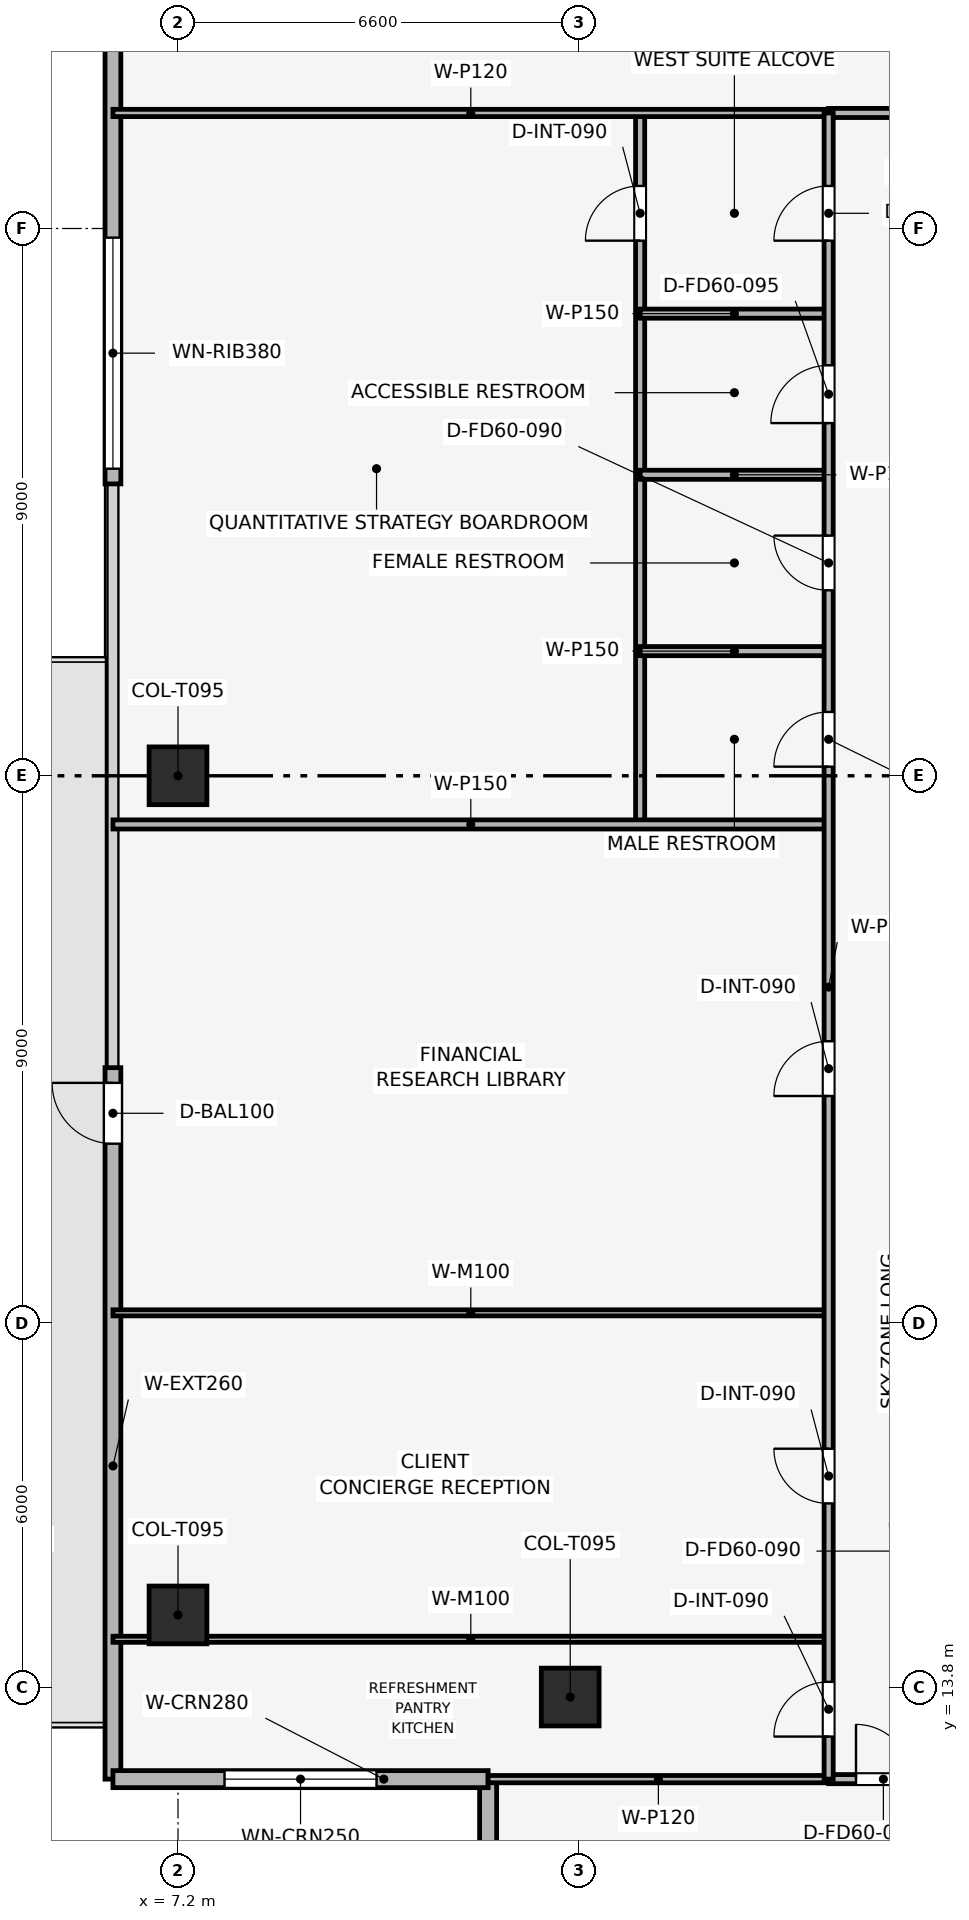
"""IFC4 building model, lengths in metres.
Left out: names, types, materials, properties, quantities, classifications, styles, units other than length and angle.
Written with IfcOpenShell. Run it as: python <this file> out.ifc"""

import sys

from ifc_helpers import new_model, si_unit, direction, frame, frame_2d, origin, origin_2d, place, context, subcontext, project, spatial, rectangle, extrude, element, fill, save


model = new_model("IFC4")
c1 = context("Model", 3, precision=1e-05, world=origin(), true_north=direction((0.0, 1.0)))
c2 = subcontext(c1, "Body", "Model", "MODEL_VIEW")
j1 = project(units=[si_unit("LENGTHUNIT", "METRE"), si_unit("PLANEANGLEUNIT", "RADIAN")], contexts=[c1])
p1 = place(None, origin())
s1 = spatial("IfcSite", under=j1, at=p1, CompositionType="ELEMENT")
p2 = place(p1, origin())
s2 = spatial("IfcBuilding", under=s1, at=p2, CompositionType="ELEMENT")
p3 = place(p2, frame((0.0, 0.0, 306.75)))
s3 = spatial("IfcBuildingStorey", under=s2, at=p3, CompositionType="ELEMENT", Elevation=306.75)
for number, where, z_axis, x_axis in (
    (1, (7.2, 28.8, 0.003), (0.0, 0.0, 1.0), (1.0, 0.0, 0.0)),
    (2, (7.2, 15.0, 0.003), (0.0, 0.0, 1.0), (1.0, 0.0, 0.0)),
    (3, (13.65, 13.65, 0.003), (0.0, 0.0, 1.0), (1.0, 0.0, 0.0)),
):
    element("IfcColumn", number, at=place(p3, frame(where, z_axis=z_axis, x_axis=x_axis)), inside=s3, PredefinedType="COLUMN", context=c2, shape_type="SweptSolid", body=[
        extrude(rectangle(XDim=0.95, YDim=0.95, at=origin_2d()), origin(), (0.0, 0.0, 1.0), 3.504),
    ])
p4 = place(p3, frame((6.13, 12.3, 0.0), z_axis=(0.0, 0.0, 1.0), x_axis=(0.0, 1.0, 0.0)))
e4 = element("IfcWall", 4, at=p4, inside=s3, PredefinedType="SOLIDWALL", context=c2, shape_type="SweptSolid", body=[
    extrude(rectangle(XDim=11.7, YDim=0.26, at=frame_2d((5.85, 0.0))), origin(), (0.0, 0.0, 1.0), 3.51),
])
p5 = place(p4, frame((10.45, 0.0, 0.0)))
e5 = element("IfcOpeningElement", 5, at=p5, cuts=e4, PredefinedType="OPENING", context=c2, shape_type="SweptSolid", body=[
    extrude(rectangle(XDim=1.0, YDim=2.2, at=frame_2d((0.5, 1.1))), frame((0.0, 0.14, 0.0), z_axis=(0.0, -1.0, 0.0), x_axis=(1.0, 0.0, 0.0)), (0.0, 0.0, 1.0), 0.28),
])
p6 = place(p3, frame((6.13, 33.6, 0.0), z_axis=(0.0, 0.0, 1.0), x_axis=(0.0, 1.0, 0.0)))
e6 = element("IfcWall", 6, at=p6, inside=s3, PredefinedType="SOLIDWALL", context=c2, shape_type="SweptSolid", body=[
    extrude(rectangle(XDim=11.7, YDim=0.26, at=frame_2d((5.85, 0.0))), origin(), (0.0, 0.0, 1.0), 3.51),
])
p7 = place(p6, frame((0.25, 0.0, 0.9)))
e7 = element("IfcOpeningElement", 7, at=p7, cuts=e6, PredefinedType="OPENING", context=c2, shape_type="SweptSolid", body=[
    extrude(rectangle(XDim=3.8, YDim=1.9, at=frame_2d((1.9, 0.95))), frame((0.0, 0.14, 0.0), z_axis=(0.0, -1.0, 0.0), x_axis=(1.0, 0.0, 0.0)), (0.0, 0.0, 1.0), 0.28),
])
p8 = place(p3, frame((12.3, 6.13, 0.0), z_axis=(0.0, 0.0, 1.0), x_axis=(0.0, 1.0, 0.0)))
e8 = element("IfcWall", 8, at=p8, inside=s3, PredefinedType="SOLIDWALL", context=c2, shape_type="SweptSolid", body=[
    extrude(rectangle(XDim=6.17, YDim=0.28, at=frame_2d((3.085, 0.0))), origin(), (0.0, 0.0, 1.0), 3.51),
])
p9 = place(p8, frame((1.835, 0.0, 0.9)))
e9 = element("IfcOpeningElement", 9, at=p9, cuts=e8, PredefinedType="OPENING", context=c2, shape_type="SweptSolid", body=[
    extrude(rectangle(XDim=2.5, YDim=1.9, at=frame_2d((1.25, 0.95))), frame((0.0, 0.15, 0.0), z_axis=(0.0, -1.0, 0.0), x_axis=(1.0, 0.0, 0.0)), (0.0, 0.0, 1.0), 0.3),
])
p10 = place(p3, frame((12.3, 12.3, 0.0), z_axis=(0.0, 0.0, 1.0), x_axis=(-1.0, 0.0, 0.0)))
e10 = element("IfcWall", 10, at=p10, inside=s3, PredefinedType="SOLIDWALL", context=c2, shape_type="SweptSolid", body=[
    extrude(rectangle(XDim=6.17, YDim=0.28, at=frame_2d((3.085, 0.0))), origin(), (0.0, 0.0, 1.0), 3.51),
])
p11 = place(p10, frame((1.835, 0.0, 0.9)))
e11 = element("IfcOpeningElement", 11, at=p11, cuts=e10, PredefinedType="OPENING", context=c2, shape_type="SweptSolid", body=[
    extrude(rectangle(XDim=2.5, YDim=1.9, at=frame_2d((1.25, 0.95))), frame((0.0, 0.15, 0.0), z_axis=(0.0, -1.0, 0.0), x_axis=(1.0, 0.0, 0.0)), (0.0, 0.0, 1.0), 0.3),
])
p12 = place(p3, frame((14.8, 28.0, 0.0), z_axis=(0.0, 0.0, 1.0), x_axis=(0.0, 1.0, 0.0)))
e12 = element("IfcWall", 12, at=p12, inside=s3, PredefinedType="PARTITIONING", context=c2, shape_type="SweptSolid", body=[
    extrude(rectangle(XDim=11.7, YDim=0.15, at=frame_2d((5.85, 0.0))), origin(), (0.0, 0.0, 1.0), 3.095),
])
p13 = place(p12, frame((9.6, 0.0, 0.0)))
e13 = element("IfcOpeningElement", 13, at=p13, cuts=e12, PredefinedType="OPENING", context=c2, shape_type="SweptSolid", body=[
    extrude(rectangle(XDim=0.9, YDim=2.1, at=frame_2d((0.45, 1.05))), frame((0.0, 0.085, 0.0), z_axis=(0.0, -1.0, 0.0), x_axis=(1.0, 0.0, 0.0)), (0.0, 0.0, 1.0), 0.17),
])
p14 = place(p3, frame((6.13, 28.0, 0.0), z_axis=(0.0, 0.0, 1.0), x_axis=(1.0, 0.0, 0.0)))
e14 = element("IfcWall", 14, at=p14, inside=s3, PredefinedType="PARTITIONING", context=c2, shape_type="SweptSolid", body=[
    extrude(rectangle(XDim=11.77, YDim=0.15, at=frame_2d((5.885, 0.0))), origin(), (0.0, 0.0, 1.0), 3.135),
])
for number, where, z_axis, x_axis in (
    (15, (14.8, 36.4, 0.0), (0.0, 0.0, 1.0), (1.0, 0.0, 0.0)),
    (16, (14.8, 30.85, 0.0), (0.0, 0.0, 1.0), (1.0, 0.0, 0.0)),
    (17, (14.8, 33.75, 0.0), (0.0, 0.0, 1.0), (1.0, 0.0, 0.0)),
):
    element("IfcWall", number, at=place(p3, frame(where, z_axis=z_axis, x_axis=x_axis)), inside=s3, PredefinedType="PARTITIONING", context=c2, shape_type="SweptSolid", body=[
        extrude(rectangle(XDim=3.1, YDim=0.15, at=frame_2d((1.55, 0.0))), origin(), (0.0, 0.0, 1.0), 3.135),
    ])
p15 = place(p3, frame((6.13, 14.6, 0.0), z_axis=(0.0, 0.0, 1.0), x_axis=(1.0, 0.0, 0.0)))
e18 = element("IfcWall", 18, at=p15, inside=s3, PredefinedType="MOVABLE", context=c2, shape_type="SweptSolid", body=[
    extrude(rectangle(XDim=11.77, YDim=0.1, at=frame_2d((5.885, 0.0))), origin(), (0.0, 0.0, 1.0), 3.095),
])
p16 = place(p3, frame((6.13, 19.968, 0.0), z_axis=(0.0, 0.0, 1.0), x_axis=(1.0, 0.0, 0.0)))
e19 = element("IfcWall", 19, at=p16, inside=s3, PredefinedType="MOVABLE", context=c2, shape_type="SweptSolid", body=[
    extrude(rectangle(XDim=11.77, YDim=0.1, at=frame_2d((5.885, 0.0))), origin(), (0.0, 0.0, 1.0), 3.195),
])
p17 = place(p3, frame((12.3, 12.3, 0.0), z_axis=(0.0, 0.0, 1.0), x_axis=(1.0, 0.0, 0.0)))
e20 = element("IfcWall", 20, at=p17, inside=s3, PredefinedType="PARTITIONING", context=c2, shape_type="SweptSolid", body=[
    extrude(rectangle(XDim=5.6, YDim=0.12, at=frame_2d((2.8, 0.0))), origin(), (0.0, 0.0, 1.0), 3.195),
])
p18 = place(p3, frame((17.9, 12.3, 0.0), z_axis=(0.0, 0.0, 1.0), x_axis=(1.0, 0.0, 0.0)))
e21 = element("IfcWall", 21, at=p18, inside=s3, PredefinedType="PARTITIONING", context=c2, shape_type="SweptSolid", body=[
    extrude(rectangle(XDim=1.9, YDim=0.15, at=frame_2d((0.95, 0.0))), origin(), (0.0, 0.0, 1.0), 3.51),
])
p19 = place(p18, frame((0.45, 0.0, 0.0)))
e22 = element("IfcOpeningElement", 22, at=p19, cuts=e21, PredefinedType="OPENING", context=c2, shape_type="SweptSolid", body=[
    extrude(rectangle(XDim=0.9, YDim=2.1, at=frame_2d((0.45, 1.05))), frame((0.0, 0.085, 0.0), z_axis=(0.0, -1.0, 0.0), x_axis=(1.0, 0.0, 0.0)), (0.0, 0.0, 1.0), 0.17),
])
p20 = place(p3, frame((6.13, 39.7, 0.0), z_axis=(0.0, 0.0, 1.0), x_axis=(1.0, 0.0, 0.0)))
e23 = element("IfcWall", 23, at=p20, inside=s3, PredefinedType="PARTITIONING", context=c2, shape_type="SweptSolid", body=[
    extrude(rectangle(XDim=11.77, YDim=0.12, at=frame_2d((5.885, 0.0))), origin(), (0.0, 0.0, 1.0), 3.095),
])
p21 = place(p3, frame((17.9, 39.7, 0.0), z_axis=(0.0, 0.0, 1.0), x_axis=(1.0, 0.0, 0.0)))
e24 = element("IfcWall", 24, at=p21, inside=s3, PredefinedType="PARTITIONING", context=c2, shape_type="SweptSolid", body=[
    extrude(rectangle(XDim=21.8, YDim=0.15, at=frame_2d((10.9, 0.0))), origin(), (0.0, 0.0, 1.0), 3.095),
])
p22 = place(p21, frame((1.302, 0.0, 0.0)))
e25 = element("IfcOpeningElement", 25, at=p22, cuts=e24, PredefinedType="OPENING", context=c2, shape_type="SweptSolid", body=[
    extrude(rectangle(XDim=0.9, YDim=2.1, at=frame_2d((0.45, 1.05))), frame((0.0, 0.085, 0.0), z_axis=(0.0, -1.0, 0.0), x_axis=(1.0, 0.0, 0.0)), (0.0, 0.0, 1.0), 0.17),
])
p23 = place(p21, frame((12.202, 0.0, 0.0)))
e26 = element("IfcOpeningElement", 26, at=p23, cuts=e24, PredefinedType="OPENING", context=c2, shape_type="SweptSolid", body=[
    extrude(rectangle(XDim=0.9, YDim=2.1, at=frame_2d((0.45, 1.05))), frame((0.0, 0.085, 0.0), z_axis=(0.0, -1.0, 0.0), x_axis=(1.0, 0.0, 0.0)), (0.0, 0.0, 1.0), 0.17),
])
p24 = place(p3, frame((17.9, 12.3, 0.0), z_axis=(0.0, 0.0, 1.0), x_axis=(0.0, 1.0, 0.0)))
e27 = element("IfcWall", 27, at=p24, inside=s3, PredefinedType="PARTITIONING", context=c2, shape_type="SweptSolid", body=[
    extrude(rectangle(XDim=27.4, YDim=0.15, at=frame_2d((13.7, 0.0))), origin(), (0.0, 0.0, 1.0), 3.095),
])
p25 = place(p24, frame((0.7, 0.0, 0.0)))
e28 = element("IfcOpeningElement", 28, at=p25, cuts=e27, PredefinedType="OPENING", context=c2, shape_type="SweptSolid", body=[
    extrude(rectangle(XDim=0.9, YDim=2.1, at=frame_2d((0.45, 1.05))), frame((0.0, 0.085, 0.0), z_axis=(0.0, -1.0, 0.0), x_axis=(1.0, 0.0, 0.0)), (0.0, 0.0, 1.0), 0.17),
])
p26 = place(p24, frame((4.534, 0.0, 0.0)))
e29 = element("IfcOpeningElement", 29, at=p26, cuts=e27, PredefinedType="OPENING", context=c2, shape_type="SweptSolid", body=[
    extrude(rectangle(XDim=0.9, YDim=2.1, at=frame_2d((0.45, 1.05))), frame((0.0, 0.085, 0.0), z_axis=(0.0, -1.0, 0.0), x_axis=(1.0, 0.0, 0.0)), (0.0, 0.0, 1.0), 0.17),
])
p27 = place(p24, frame((11.234, 0.0, 0.0)))
e30 = element("IfcOpeningElement", 30, at=p27, cuts=e27, PredefinedType="OPENING", context=c2, shape_type="SweptSolid", body=[
    extrude(rectangle(XDim=0.9, YDim=2.1, at=frame_2d((0.45, 1.05))), frame((0.0, 0.085, 0.0), z_axis=(0.0, -1.0, 0.0), x_axis=(1.0, 0.0, 0.0)), (0.0, 0.0, 1.0), 0.17),
])
p28 = place(p24, frame((16.65, 0.0, 0.0)))
e31 = element("IfcOpeningElement", 31, at=p28, cuts=e27, PredefinedType="OPENING", context=c2, shape_type="SweptSolid", body=[
    extrude(rectangle(XDim=0.9, YDim=2.1, at=frame_2d((0.45, 1.05))), frame((0.0, 0.085, 0.0), z_axis=(0.0, -1.0, 0.0), x_axis=(1.0, 0.0, 0.0)), (0.0, 0.0, 1.0), 0.17),
])
p29 = place(p24, frame((19.55, 0.0, 0.0)))
e32 = element("IfcOpeningElement", 32, at=p29, cuts=e27, PredefinedType="OPENING", context=c2, shape_type="SweptSolid", body=[
    extrude(rectangle(XDim=0.9, YDim=2.1, at=frame_2d((0.45, 1.05))), frame((0.0, 0.085, 0.0), z_axis=(0.0, -1.0, 0.0), x_axis=(1.0, 0.0, 0.0)), (0.0, 0.0, 1.0), 0.17),
])
p30 = place(p24, frame((22.3, 0.0, 0.0)))
e33 = element("IfcOpeningElement", 33, at=p30, cuts=e27, PredefinedType="OPENING", context=c2, shape_type="SweptSolid", body=[
    extrude(rectangle(XDim=0.95, YDim=2.1, at=frame_2d((0.475, 1.05))), frame((0.0, 0.085, 0.0), z_axis=(0.0, -1.0, 0.0), x_axis=(1.0, 0.0, 0.0)), (0.0, 0.0, 1.0), 0.17),
])
p31 = place(p24, frame((25.3, 0.0, 0.0)))
e34 = element("IfcOpeningElement", 34, at=p31, cuts=e27, PredefinedType="OPENING", context=c2, shape_type="SweptSolid", body=[
    extrude(rectangle(XDim=0.9, YDim=2.1, at=frame_2d((0.45, 1.05))), frame((0.0, 0.085, 0.0), z_axis=(0.0, -1.0, 0.0), x_axis=(1.0, 0.0, 0.0)), (0.0, 0.0, 1.0), 0.17),
])
p32 = place(p5, origin())
e35 = element("IfcDoor", 35, at=p32, inside=s3, OperationType="SINGLE_SWING_RIGHT", PredefinedType="DOOR", context=c2, shape_type="SweptSolid", body=[
    extrude(rectangle(XDim=1.0, YDim=2.2, at=frame_2d((0.5, 1.1))), frame((0.0, 0.025, 0.0), z_axis=(0.0, -1.0, 0.0), x_axis=(1.0, 0.0, 0.0)), (0.0, 0.0, 1.0), 0.05),
])
fill(e5, e35)
p33 = place(p7, origin())
e36 = element("IfcWindow", 36, at=p33, inside=s3, PartitioningType="SINGLE_PANEL", PredefinedType="WINDOW", context=c2, shape_type="SweptSolid", body=[
    extrude(rectangle(XDim=3.8, YDim=1.9, at=frame_2d((1.9, 0.95))), frame((0.0, 0.03, 0.0), z_axis=(0.0, -1.0, 0.0), x_axis=(1.0, 0.0, 0.0)), (0.0, 0.0, 1.0), 0.06),
])
fill(e7, e36)
p34 = place(p11, origin())
e37 = element("IfcWindow", 37, at=p34, inside=s3, PartitioningType="SINGLE_PANEL", PredefinedType="WINDOW", context=c2, shape_type="SweptSolid", body=[
    extrude(rectangle(XDim=2.5, YDim=1.9, at=frame_2d((1.25, 0.95))), frame((0.0, 0.03, 0.0), z_axis=(0.0, -1.0, 0.0), x_axis=(1.0, 0.0, 0.0)), (0.0, 0.0, 1.0), 0.06),
])
fill(e11, e37)
p35 = place(p13, origin())
e38 = element("IfcDoor", 38, at=p35, inside=s3, OperationType="SINGLE_SWING_LEFT", PredefinedType="DOOR", context=c2, shape_type="SweptSolid", body=[
    extrude(rectangle(XDim=0.9, YDim=2.1, at=frame_2d((0.45, 1.05))), frame((0.0, 0.025, 0.0), z_axis=(0.0, -1.0, 0.0), x_axis=(1.0, 0.0, 0.0)), (0.0, 0.0, 1.0), 0.05),
])
fill(e13, e38)
p36 = place(p19, origin())
e39 = element("IfcDoor", 39, at=p36, inside=s3, OperationType="SINGLE_SWING_LEFT", PredefinedType="DOOR", context=c2, shape_type="SweptSolid", body=[
    extrude(rectangle(XDim=0.9, YDim=2.1, at=frame_2d((0.45, 1.05))), frame((0.0, 0.025, 0.0), z_axis=(0.0, -1.0, 0.0), x_axis=(1.0, 0.0, 0.0)), (0.0, 0.0, 1.0), 0.05),
])
fill(e22, e39)
p37 = place(p25, origin())
e40 = element("IfcDoor", 40, at=p37, inside=s3, OperationType="SINGLE_SWING_LEFT", PredefinedType="DOOR", context=c2, shape_type="SweptSolid", body=[
    extrude(rectangle(XDim=0.9, YDim=2.1, at=frame_2d((0.45, 1.05))), frame((0.0, 0.025, 0.0), z_axis=(0.0, -1.0, 0.0), x_axis=(1.0, 0.0, 0.0)), (0.0, 0.0, 1.0), 0.05),
])
fill(e28, e40)
p38 = place(p26, origin())
e41 = element("IfcDoor", 41, at=p38, inside=s3, OperationType="SINGLE_SWING_RIGHT", PredefinedType="DOOR", context=c2, shape_type="SweptSolid", body=[
    extrude(rectangle(XDim=0.9, YDim=2.1, at=frame_2d((0.45, 1.05))), frame((0.0, 0.025, 0.0), z_axis=(0.0, -1.0, 0.0), x_axis=(1.0, 0.0, 0.0)), (0.0, 0.0, 1.0), 0.05),
])
fill(e29, e41)
p39 = place(p27, origin())
e42 = element("IfcDoor", 42, at=p39, inside=s3, OperationType="SINGLE_SWING_LEFT", PredefinedType="DOOR", context=c2, shape_type="SweptSolid", body=[
    extrude(rectangle(XDim=0.9, YDim=2.1, at=frame_2d((0.45, 1.05))), frame((0.0, 0.025, 0.0), z_axis=(0.0, -1.0, 0.0), x_axis=(1.0, 0.0, 0.0)), (0.0, 0.0, 1.0), 0.05),
])
fill(e30, e42)
p40 = place(p28, origin())
e43 = element("IfcDoor", 43, at=p40, inside=s3, OperationType="SINGLE_SWING_LEFT", PredefinedType="DOOR", context=c2, shape_type="SweptSolid", body=[
    extrude(rectangle(XDim=0.9, YDim=2.1, at=frame_2d((0.45, 1.05))), frame((0.0, 0.025, 0.0), z_axis=(0.0, -1.0, 0.0), x_axis=(1.0, 0.0, 0.0)), (0.0, 0.0, 1.0), 0.05),
])
fill(e31, e43)
p41 = place(p29, origin())
e44 = element("IfcDoor", 44, at=p41, inside=s3, OperationType="SINGLE_SWING_RIGHT", PredefinedType="DOOR", context=c2, shape_type="SweptSolid", body=[
    extrude(rectangle(XDim=0.9, YDim=2.1, at=frame_2d((0.45, 1.05))), frame((0.0, 0.025, 0.0), z_axis=(0.0, -1.0, 0.0), x_axis=(1.0, 0.0, 0.0)), (0.0, 0.0, 1.0), 0.05),
])
fill(e32, e44)
p42 = place(p30, origin())
e45 = element("IfcDoor", 45, at=p42, inside=s3, OperationType="SINGLE_SWING_LEFT", PredefinedType="DOOR", context=c2, shape_type="SweptSolid", body=[
    extrude(rectangle(XDim=0.95, YDim=2.1, at=frame_2d((0.475, 1.05))), frame((0.0, 0.025, 0.0), z_axis=(0.0, -1.0, 0.0), x_axis=(1.0, 0.0, 0.0)), (0.0, 0.0, 1.0), 0.05),
])
fill(e33, e45)
p43 = place(p31, origin())
e46 = element("IfcDoor", 46, at=p43, inside=s3, OperationType="SINGLE_SWING_LEFT", PredefinedType="DOOR", context=c2, shape_type="SweptSolid", body=[
    extrude(rectangle(XDim=0.9, YDim=2.1, at=frame_2d((0.45, 1.05))), frame((0.0, 0.025, 0.0), z_axis=(0.0, -1.0, 0.0), x_axis=(1.0, 0.0, 0.0)), (0.0, 0.0, 1.0), 0.05),
])
fill(e34, e46)
save(model, sys.argv[1])
